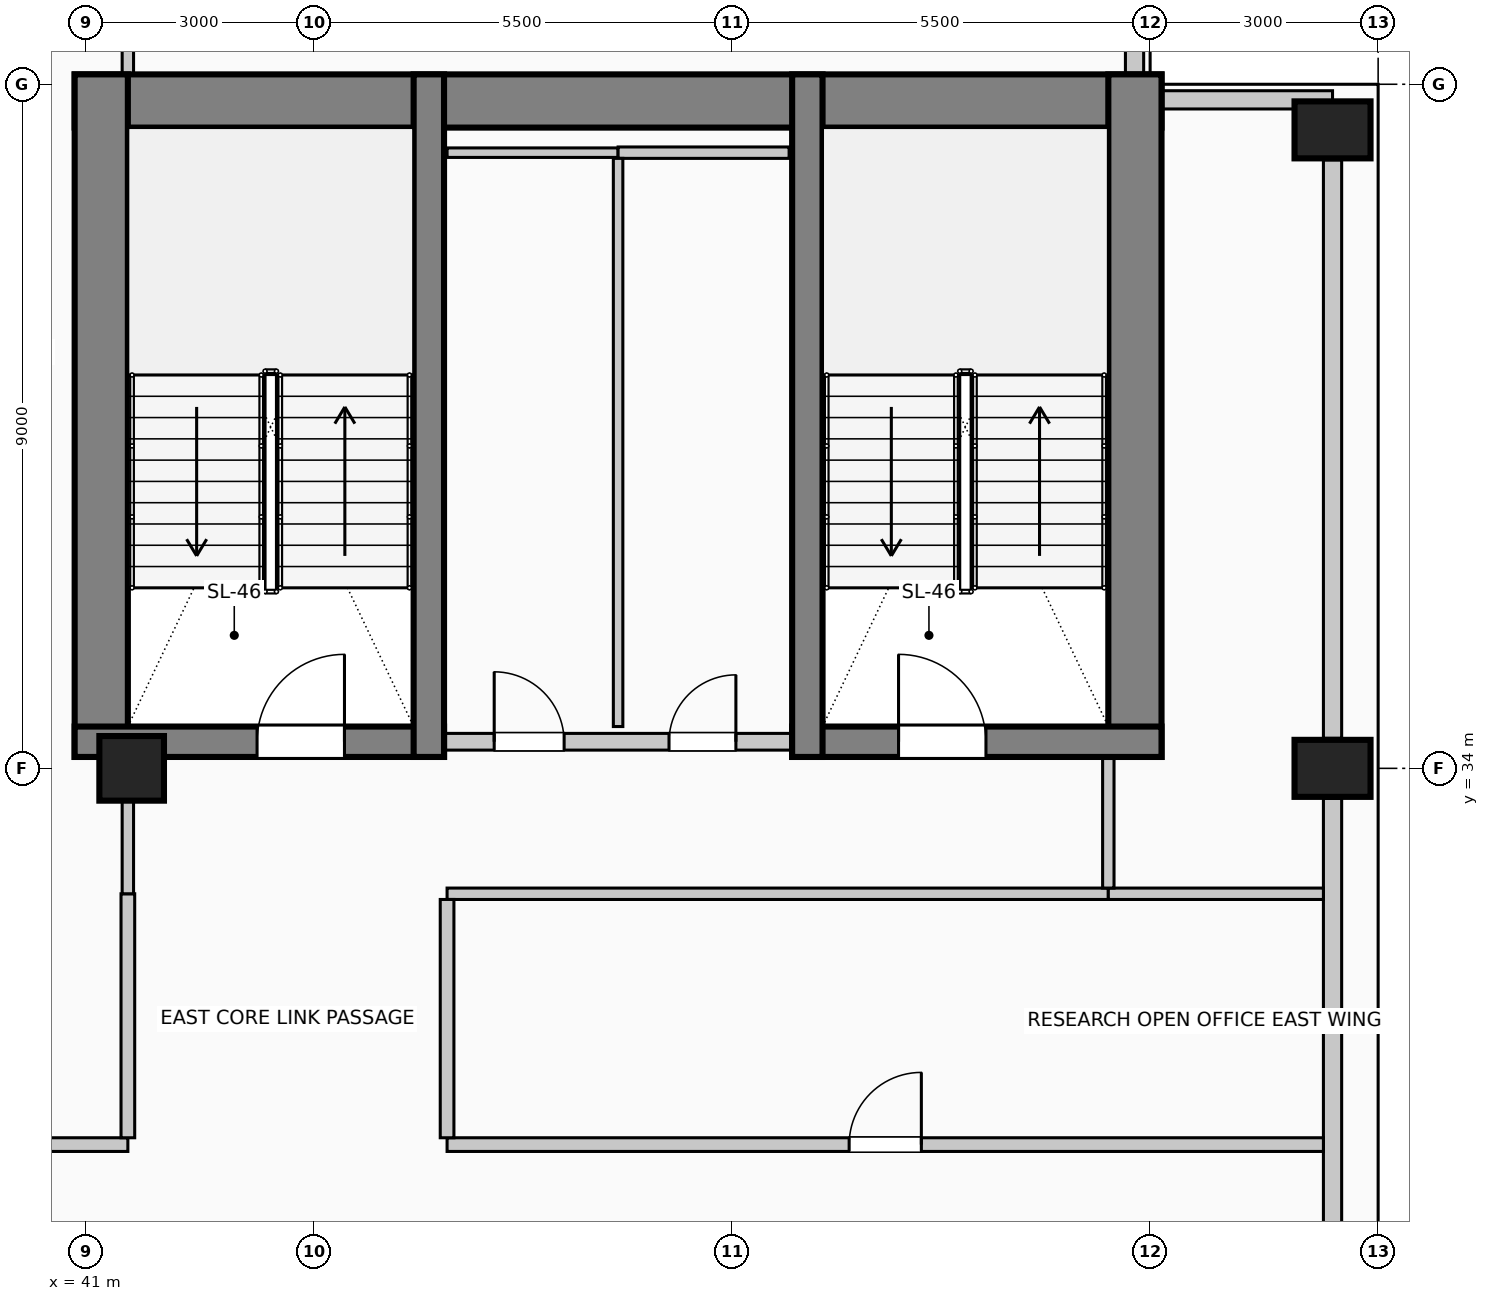
"""IFC4 building model, lengths in metres.
Left out: names, types, materials, properties, quantities, classifications, styles, units other than length and angle.
Written with IfcOpenShell. Run it as: python <this file> out.ifc"""

import sys

from ifc_helpers import new_model, si_unit, direction, frame, frame_2d, origin, origin_2d, place, context, subcontext, project, spatial, rectangle, circle, extrude, element, fill, save


model = new_model("IFC4")
c1 = context("Model", 3, precision=1e-05, world=origin(), true_north=direction((0.0, 1.0)))
c2 = subcontext(c1, "Body", "Model", "MODEL_VIEW")
j1 = project(units=[si_unit("LENGTHUNIT", "METRE"), si_unit("PLANEANGLEUNIT", "RADIAN")], contexts=[c1])
p1 = place(None, origin())
s1 = spatial("IfcSite", under=j1, at=p1, CompositionType="ELEMENT")
p2 = place(p1, origin())
s2 = spatial("IfcBuilding", under=s1, at=p2, CompositionType="ELEMENT")
p3 = place(p2, frame((0.0, 0.0, 230.6)))
s3 = spatial("IfcBuildingStorey", under=s2, at=p3, CompositionType="ELEMENT", Elevation=230.6)
p4 = place(p3, frame((40.85, 42.78, 0.0), z_axis=(0.0, 0.0, 1.0), x_axis=(1.0, 0.0, 0.0)))
e1 = element("IfcWall", 1, at=p4, inside=s3, PredefinedType="SHEAR", context=c2, shape_type="SweptSolid", body=[
    extrude(rectangle(XDim=14.3, YDim=0.7, at=frame_2d((7.15, 0.0))), origin(), (0.0, 0.0, 1.0), 4.0),
])
for number, where, z_axis, x_axis in (
    (2, (41.2, 34.15, 0.0), (0.0, 0.0, 1.0), (0.0, 1.0, 0.0)),
    (3, (54.8, 34.15, 0.0), (0.0, 0.0, 1.0), (0.0, 1.0, 0.0)),
):
    element("IfcWall", number, at=place(p3, frame(where, z_axis=z_axis, x_axis=x_axis)), inside=s3, PredefinedType="SHEAR", context=c2, shape_type="SweptSolid", body=[
        extrude(rectangle(XDim=8.98, YDim=0.7, at=frame_2d((4.49, 0.0))), origin(), (0.0, 0.0, 1.0), 4.0),
    ])
p5 = place(p3, frame((40.85, 34.35, 0.0), z_axis=(0.0, 0.0, 1.0), x_axis=(1.0, 0.0, 0.0)))
e4 = element("IfcWall", 4, at=p5, inside=s3, PredefinedType="SHEAR", context=c2, shape_type="SweptSolid", body=[
    extrude(rectangle(XDim=4.86, YDim=0.4, at=frame_2d((2.43, 0.0))), origin(), (0.0, 0.0, 1.0), 4.0),
])
p6 = place(p5, frame((2.4, 0.0, 0.0)))
e5 = element("IfcOpeningElement", 5, at=p6, cuts=e4, PredefinedType="OPENING", context=c2, shape_type="SweptSolid", body=[
    extrude(rectangle(XDim=1.15, YDim=2.2, at=frame_2d((0.575, 1.1))), frame((0.0, 0.21, 0.0), z_axis=(0.0, -1.0, 0.0), x_axis=(1.0, 0.0, 0.0)), (0.0, 0.0, 1.0), 0.42),
])
p7 = place(p3, frame((45.51, 34.15, 0.0), z_axis=(0.0, 0.0, 1.0), x_axis=(0.0, 1.0, 0.0)))
e6 = element("IfcWall", 6, at=p7, inside=s3, PredefinedType="SHEAR", context=c2, shape_type="SweptSolid", body=[
    extrude(rectangle(XDim=8.98, YDim=0.4, at=frame_2d((4.49, 0.0))), origin(), (0.0, 0.0, 1.0), 4.0),
])
p8 = place(p3, frame((50.29, 34.35, 0.0), z_axis=(0.0, 0.0, 1.0), x_axis=(1.0, 0.0, 0.0)))
e7 = element("IfcWall", 7, at=p8, inside=s3, PredefinedType="SHEAR", context=c2, shape_type="SweptSolid", body=[
    extrude(rectangle(XDim=4.86, YDim=0.4, at=frame_2d((2.43, 0.0))), origin(), (0.0, 0.0, 1.0), 4.0),
])
p9 = place(p8, frame((1.4, 0.0, 0.0)))
e8 = element("IfcOpeningElement", 8, at=p9, cuts=e7, PredefinedType="OPENING", context=c2, shape_type="SweptSolid", body=[
    extrude(rectangle(XDim=1.15, YDim=2.2, at=frame_2d((0.575, 1.1))), frame((0.0, 0.21, 0.0), z_axis=(0.0, -1.0, 0.0), x_axis=(1.0, 0.0, 0.0)), (0.0, 0.0, 1.0), 0.42),
])
p10 = place(p3, frame((50.49, 34.15, 0.0), z_axis=(0.0, 0.0, 1.0), x_axis=(0.0, 1.0, 0.0)))
e9 = element("IfcWall", 9, at=p10, inside=s3, PredefinedType="SHEAR", context=c2, shape_type="SweptSolid", body=[
    extrude(rectangle(XDim=8.98, YDim=0.4, at=frame_2d((4.49, 0.0))), origin(), (0.0, 0.0, 1.0), 4.0),
])
for number, where, z_axis, x_axis in (
    (10, (57.4, 34.0, 0.0), (0.0, 0.0, 1.0), (0.0, 1.0, 0.0)),
    (11, (57.4, 42.4, 0.0), (0.0, 0.0, 1.0), (0.0, 1.0, 0.0)),
):
    element("IfcColumn", number, at=place(p3, frame(where, z_axis=z_axis, x_axis=x_axis)), inside=s3, PredefinedType="COLUMN", context=c2, shape_type="SweptSolid", body=[
        extrude(rectangle(XDim=0.75, YDim=1.0, at=origin_2d()), origin(), (0.0, 0.0, 1.0), 4.0),
    ])
p11 = place(p3, frame((41.6, 34.0, 0.0), z_axis=(0.0, 0.0, 1.0), x_axis=(1.0, 0.0, 0.0)))
e12 = element("IfcColumn", 12, at=p11, inside=s3, PredefinedType="COLUMN", context=c2, shape_type="SweptSolid", body=[
    extrude(circle(Radius=0.425, at=origin_2d()), origin(), (0.0, 0.0, 1.0), 4.0),
])
p12 = place(p3, frame((57.4, 33.605, 0.0), z_axis=(0.0, 0.0, 1.0), x_axis=(0.0, -1.0, 0.0)))
e13 = element("IfcWall", 13, at=p12, inside=s3, PredefinedType="SOLIDWALL", context=c2, shape_type="SweptSolid", body=[
    extrude(rectangle(XDim=7.21, YDim=0.24, at=frame_2d((3.605, 0.0))), origin(), (0.0, 0.0, 1.0), 3.0),
])
p13 = place(p3, frame((57.4, 42.005, 0.0), z_axis=(0.0, 0.0, 1.0), x_axis=(0.0, -1.0, 0.0)))
e14 = element("IfcWall", 14, at=p13, inside=s3, PredefinedType="SOLIDWALL", context=c2, shape_type="SweptSolid", body=[
    extrude(rectangle(XDim=7.61, YDim=0.24, at=frame_2d((3.805, 0.0))), origin(), (0.0, 0.0, 1.0), 3.0),
])
p14 = place(p3, frame((54.795, 45.4, 0.0), z_axis=(0.0, 0.0, 1.0), x_axis=(0.0, -1.0, 0.0)))
e15 = element("IfcWall", 15, at=p14, inside=s3, PredefinedType="SOLIDWALL", context=c2, shape_type="SweptSolid", body=[
    extrude(rectangle(XDim=2.265, YDim=0.24, at=frame_2d((1.132, 0.0))), origin(), (0.0, 0.0, 1.0), 3.75),
])
p15 = place(p3, frame((55.155, 42.795, 0.0), z_axis=(0.0, 0.0, 1.0), x_axis=(1.0, 0.0, 0.0)))
e16 = element("IfcWall", 16, at=p15, inside=s3, PredefinedType="SOLIDWALL", context=c2, shape_type="SweptSolid", body=[
    extrude(rectangle(XDim=2.245, YDim=0.24, at=frame_2d((1.123, 0.0))), origin(), (0.0, 0.0, 1.0), 3.75),
])
p16 = place(p3, frame((45.72, 34.35, 0.0), z_axis=(0.0, 0.0, 1.0), x_axis=(1.0, 0.0, 0.0)))
e17 = element("IfcWall", 17, at=p16, inside=s3, PredefinedType="PARTITIONING", context=c2, shape_type="SweptSolid", body=[
    extrude(rectangle(XDim=4.56, YDim=0.22, at=frame_2d((2.28, 0.0))), origin(), (0.0, 0.0, 1.0), 3.75),
])
p17 = place(p16, frame((0.65, 0.0, 0.0)))
e18 = element("IfcOpeningElement", 18, at=p17, cuts=e17, PredefinedType="OPENING", context=c2, shape_type="SweptSolid", body=[
    extrude(rectangle(XDim=0.92, YDim=2.1, at=frame_2d((0.46, 1.05))), frame((0.0, 0.12, 0.0), z_axis=(0.0, -1.0, 0.0), x_axis=(1.0, 0.0, 0.0)), (0.0, 0.0, 1.0), 0.24),
])
p18 = place(p16, frame((2.95, 0.0, 0.0)))
e19 = element("IfcOpeningElement", 19, at=p18, cuts=e17, PredefinedType="OPENING", context=c2, shape_type="SweptSolid", body=[
    extrude(rectangle(XDim=0.88, YDim=2.1, at=frame_2d((0.44, 1.05))), frame((0.0, 0.12, 0.0), z_axis=(0.0, -1.0, 0.0), x_axis=(1.0, 0.0, 0.0)), (0.0, 0.0, 1.0), 0.24),
])
p19 = place(p3, frame((35.99, 29.05, 0.0), z_axis=(0.0, 0.0, 1.0), x_axis=(1.0, 0.0, 0.0)))
e20 = element("IfcWall", 20, at=p19, inside=s3, PredefinedType="PARTITIONING", context=c2, shape_type="SweptSolid", body=[
    extrude(rectangle(XDim=5.56, YDim=0.18, at=frame_2d((2.78, 0.0))), origin(), (0.0, 0.0, 1.0), 3.75),
])
p20 = place(p19, frame((2.255, 0.0, 0.0)))
e21 = element("IfcOpeningElement", 21, at=p20, cuts=e20, PredefinedType="OPENING", context=c2, shape_type="SweptSolid", body=[
    extrude(rectangle(XDim=1.05, YDim=2.15, at=frame_2d((0.525, 1.075))), frame((0.0, 0.1, 0.0), z_axis=(0.0, -1.0, 0.0), x_axis=(1.0, 0.0, 0.0)), (0.0, 0.0, 1.0), 0.2),
])
p21 = place(p3, frame((45.75, 29.05, 0.0), z_axis=(0.0, 0.0, 1.0), x_axis=(1.0, 0.0, 0.0)))
e22 = element("IfcWall", 22, at=p21, inside=s3, PredefinedType="PARTITIONING", context=c2, shape_type="SweptSolid", body=[
    extrude(rectangle(XDim=11.53, YDim=0.18, at=frame_2d((5.765, 0.0))), origin(), (0.0, 0.0, 1.0), 3.75),
])
p22 = place(p21, frame((5.29, 0.0, 0.0)))
e23 = element("IfcOpeningElement", 23, at=p22, cuts=e22, PredefinedType="OPENING", context=c2, shape_type="SweptSolid", body=[
    extrude(rectangle(XDim=0.95, YDim=2.15, at=frame_2d((0.475, 1.075))), frame((0.0, 0.1, 0.0), z_axis=(0.0, -1.0, 0.0), x_axis=(1.0, 0.0, 0.0)), (0.0, 0.0, 1.0), 0.2),
])
p23 = place(p3, frame((45.75, 32.35, 0.0), z_axis=(0.0, 0.0, 1.0), x_axis=(1.0, 0.0, 0.0)))
e24 = element("IfcWall", 24, at=p23, inside=s3, PredefinedType="PARTITIONING", context=c2, shape_type="SweptSolid", body=[
    extrude(rectangle(XDim=8.7, YDim=0.15, at=frame_2d((4.35, 0.0))), origin(), (0.0, 0.0, 1.0), 3.75),
])
p24 = place(p3, frame((54.45, 32.35, 0.0), z_axis=(0.0, 0.0, 1.0), x_axis=(1.0, 0.0, 0.0)))
e25 = element("IfcWall", 25, at=p24, inside=s3, PredefinedType="PARTITIONING", context=c2, shape_type="SweptSolid", body=[
    extrude(rectangle(XDim=2.83, YDim=0.15, at=frame_2d((1.415, 0.0))), origin(), (0.0, 0.0, 1.0), 3.75),
])
p25 = place(p3, frame((45.75, 42.1, 0.0), z_axis=(0.0, 0.0, 1.0), x_axis=(1.0, 0.0, 0.0)))
e26 = element("IfcWall", 26, at=p25, inside=s3, PredefinedType="PARTITIONING", context=c2, shape_type="SweptSolid", body=[
    extrude(rectangle(XDim=2.25, YDim=0.125, at=frame_2d((1.125, 0.0))), origin(), (0.0, 0.0, 1.0), 3.75),
])
p26 = place(p3, frame((48.0, 42.1, 0.0), z_axis=(0.0, 0.0, 1.0), x_axis=(1.0, 0.0, 0.0)))
e27 = element("IfcWall", 27, at=p26, inside=s3, PredefinedType="PARTITIONING", context=c2, shape_type="SweptSolid", body=[
    extrude(rectangle(XDim=2.25, YDim=0.15, at=frame_2d((1.125, 0.0))), origin(), (0.0, 0.0, 1.0), 3.75),
])
p27 = place(p3, frame((41.55, 29.14, 0.0), z_axis=(0.0, 0.0, 1.0), x_axis=(0.0, 1.0, 0.0)))
e28 = element("IfcWall", 28, at=p27, inside=s3, PredefinedType="PARTITIONING", context=c2, shape_type="SweptSolid", body=[
    extrude(rectangle(XDim=3.21, YDim=0.18, at=frame_2d((1.605, 0.0))), origin(), (0.0, 0.0, 1.0), 3.145),
])
p28 = place(p3, frame((41.55, 32.35, 0.0), z_axis=(0.0, 0.0, 1.0), x_axis=(0.0, 1.0, 0.0)))
e29 = element("IfcWall", 29, at=p28, inside=s3, PredefinedType="PARTITIONING", context=c2, shape_type="SweptSolid", body=[
    extrude(rectangle(XDim=1.225, YDim=0.15, at=frame_2d((0.612, 0.0))), origin(), (0.0, 0.0, 1.0), 3.145),
])
p29 = place(p3, frame((41.55, 43.13, 0.0), z_axis=(0.0, 0.0, 1.0), x_axis=(0.0, 1.0, 0.0)))
e30 = element("IfcWall", 30, at=p29, inside=s3, PredefinedType="PARTITIONING", context=c2, shape_type="SweptSolid", body=[
    extrude(rectangle(XDim=1.62, YDim=0.15, at=frame_2d((0.81, 0.0))), origin(), (0.0, 0.0, 1.0), 3.75),
])
p30 = place(p3, frame((45.75, 29.14, 0.0), z_axis=(0.0, 0.0, 1.0), x_axis=(0.0, 1.0, 0.0)))
e31 = element("IfcWall", 31, at=p30, inside=s3, PredefinedType="PARTITIONING", context=c2, shape_type="SweptSolid", body=[
    extrude(rectangle(XDim=3.135, YDim=0.18, at=frame_2d((1.567, 0.0))), origin(), (0.0, 0.0, 1.0), 3.75),
])
p31 = place(p3, frame((48.0, 34.55, 0.0), z_axis=(0.0, 0.0, 1.0), x_axis=(0.0, 1.0, 0.0)))
e32 = element("IfcWall", 32, at=p31, inside=s3, PredefinedType="PARTITIONING", context=c2, shape_type="SweptSolid", body=[
    extrude(rectangle(XDim=7.475, YDim=0.125, at=frame_2d((3.737, 0.0))), origin(), (0.0, 0.0, 1.0), 3.75),
])
p32 = place(p3, frame((54.45, 32.425, 0.0), z_axis=(0.0, 0.0, 1.0), x_axis=(0.0, 1.0, 0.0)))
e33 = element("IfcWall", 33, at=p32, inside=s3, PredefinedType="PARTITIONING", context=c2, shape_type="SweptSolid", body=[
    extrude(rectangle(XDim=1.725, YDim=0.15, at=frame_2d((0.862, 0.0))), origin(), (0.0, 0.0, 1.0), 3.75),
])
p33 = place(p6, origin())
e34 = element("IfcDoor", 34, at=p33, inside=s3, OperationType="SINGLE_SWING_RIGHT", PredefinedType="DOOR", context=c2, shape_type="SweptSolid", body=[
    extrude(rectangle(XDim=1.15, YDim=2.2, at=frame_2d((0.575, 1.1))), frame((0.0, 0.025, 0.0), z_axis=(0.0, -1.0, 0.0), x_axis=(1.0, 0.0, 0.0)), (0.0, 0.0, 1.0), 0.05),
])
fill(e5, e34)
p34 = place(p17, origin())
e35 = element("IfcDoor", 35, at=p34, inside=s3, OperationType="SINGLE_SWING_LEFT", PredefinedType="DOOR", context=c2, shape_type="SweptSolid", body=[
    extrude(rectangle(XDim=0.92, YDim=2.1, at=frame_2d((0.46, 1.05))), frame((0.0, 0.025, 0.0), z_axis=(0.0, -1.0, 0.0), x_axis=(1.0, 0.0, 0.0)), (0.0, 0.0, 1.0), 0.05),
])
fill(e18, e35)
p35 = place(p18, origin())
e36 = element("IfcDoor", 36, at=p35, inside=s3, OperationType="SINGLE_SWING_RIGHT", PredefinedType="DOOR", context=c2, shape_type="SweptSolid", body=[
    extrude(rectangle(XDim=0.88, YDim=2.1, at=frame_2d((0.44, 1.05))), frame((0.0, 0.025, 0.0), z_axis=(0.0, -1.0, 0.0), x_axis=(1.0, 0.0, 0.0)), (0.0, 0.0, 1.0), 0.05),
])
fill(e19, e36)
p36 = place(p9, origin())
e37 = element("IfcDoor", 37, at=p36, inside=s3, OperationType="SINGLE_SWING_LEFT", PredefinedType="DOOR", context=c2, shape_type="SweptSolid", body=[
    extrude(rectangle(XDim=1.15, YDim=2.2, at=frame_2d((0.575, 1.1))), frame((0.0, 0.025, 0.0), z_axis=(0.0, -1.0, 0.0), x_axis=(1.0, 0.0, 0.0)), (0.0, 0.0, 1.0), 0.05),
])
fill(e8, e37)
p37 = place(p22, origin())
e38 = element("IfcDoor", 38, at=p37, inside=s3, OperationType="SINGLE_SWING_RIGHT", PredefinedType="DOOR", context=c2, shape_type="SweptSolid", body=[
    extrude(rectangle(XDim=0.95, YDim=2.15, at=frame_2d((0.475, 1.075))), frame((0.0, 0.025, 0.0), z_axis=(0.0, -1.0, 0.0), x_axis=(1.0, 0.0, 0.0)), (0.0, 0.0, 1.0), 0.05),
])
fill(e23, e38)
save(model, sys.argv[1])
